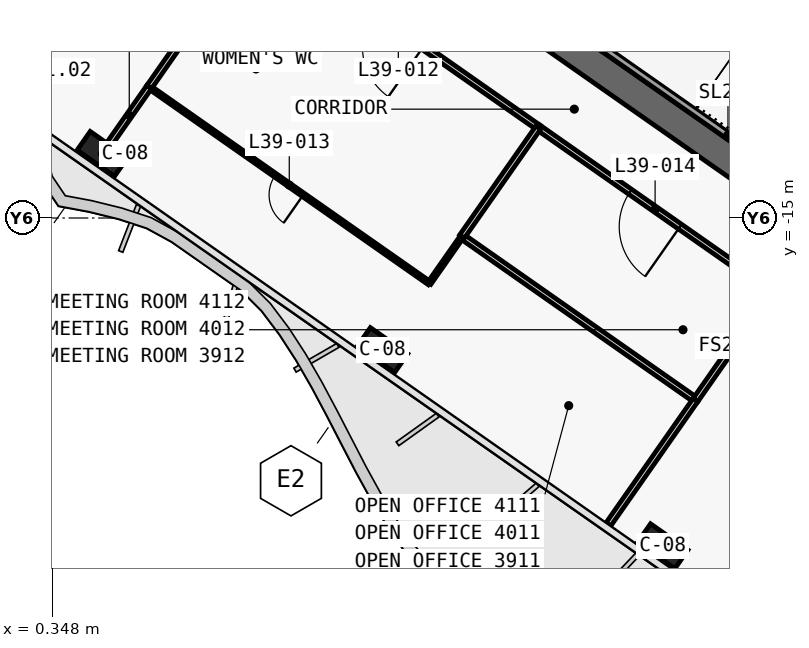
"""IFC4 building model, lengths in metres.
Left out: names, types, materials, properties, quantities, classifications, styles, units other than length and angle.
Written with IfcOpenShell. Run it as: python <this file> out.ifc"""

import sys

from ifc_helpers import new_model, si_unit, direction, frame, frame_2d, origin, origin_2d, place, context, subcontext, project, spatial, polyline, rectangle, outline, extrude, element, fill, save


model = new_model("IFC4")
c1 = context("Model", 3, precision=1e-05, world=origin(), true_north=direction((0.0, 1.0)))
c2 = subcontext(c1, "Body", "Model", "MODEL_VIEW")
j1 = project(units=[si_unit("LENGTHUNIT", "METRE"), si_unit("PLANEANGLEUNIT", "RADIAN")], contexts=[c1])
p1 = place(None, origin())
s1 = spatial("IfcSite", under=j1, at=p1, CompositionType="ELEMENT")
p2 = place(p1, origin())
s2 = spatial("IfcBuilding", under=s1, at=p2, CompositionType="ELEMENT")
p3 = place(p2, frame((0.0, 0.0, 171.0)))
s3 = spatial("IfcBuildingStorey", under=s2, at=p3, CompositionType="ELEMENT", Elevation=171.0)
p4 = place(p3, frame((-0.029, -0.712, 0.0), z_axis=(0.0, 0.0, 1.0), x_axis=(0.819151758019, -0.573576845187, 0.0)))
e1 = element("IfcWall", 1, at=p4, inside=s3, PredefinedType="SHEAR", context=c2, shape_type="SweptSolid", body=[
    extrude(outline(polyline([(26.616, 0.4), (-0.0, 0.4), (0.56, -0.4), (26.616, -0.4), (26.616, 0.4)])), origin(), (0.0, 0.0, 1.0), 3.9),
])
p5 = place(p4, frame((0.966, 0.0, 0.0)))
e2 = element("IfcOpeningElement", 2, at=p5, cuts=e1, PredefinedType="OPENING", context=c2, shape_type="SweptSolid", body=[
    extrude(rectangle(XDim=1.5, YDim=2.1, at=frame_2d((0.75, 1.05))), frame((0.0, 0.41, 0.0), z_axis=(0.0, -1.0, 0.0), x_axis=(1.0, 0.0, 0.0)), (0.0, 0.0, 1.0), 0.82),
])
p6 = place(p4, frame((12.366, 0.0, 0.0)))
e3 = element("IfcOpeningElement", 3, at=p6, cuts=e1, PredefinedType="OPENING", context=c2, shape_type="SweptSolid", body=[
    extrude(rectangle(XDim=1.5, YDim=2.1, at=frame_2d((0.75, 1.05))), frame((0.0, 0.41, 0.0), z_axis=(0.0, -1.0, 0.0), x_axis=(1.0, 0.0, 0.0)), (0.0, 0.0, 1.0), 0.82),
])
p7 = place(p3, frame((2.638, 3.768, 0.0), z_axis=(0.0, 0.0, 1.0), x_axis=(0.81915267502, -0.573575535572, 0.0)))
e4 = element("IfcWall", 4, at=p7, inside=s3, PredefinedType="SHEAR", context=c2, shape_type="SweptSolid", body=[
    extrude(outline(polyline([(0.0, 0.2), (0.0, -0.2), (26.2, -0.2), (26.2, 0.2), (0.0, 0.2)])), origin(), (0.0, 0.0, 1.0), 3.9),
])
p8 = place(p7, frame((9.637, 0.0, 0.0)))
e5 = element("IfcOpeningElement", 5, at=p8, cuts=e4, PredefinedType="OPENING", context=c2, shape_type="SweptSolid", body=[
    extrude(rectangle(XDim=1.2, YDim=2.1, at=frame_2d((0.6, 1.05))), frame((0.0, 0.21, 0.0), z_axis=(0.0, -1.0, 0.0), x_axis=(1.0, 0.0, 0.0)), (0.0, 0.0, 1.0), 0.42),
])
p9 = place(p7, frame((11.812, 0.0, 0.0)))
e6 = element("IfcOpeningElement", 6, at=p9, cuts=e4, PredefinedType="OPENING", context=c2, shape_type="SweptSolid", body=[
    extrude(rectangle(XDim=1.2, YDim=2.1, at=frame_2d((0.6, 1.05))), frame((0.0, 0.21, 0.0), z_axis=(0.0, -1.0, 0.0), x_axis=(1.0, 0.0, 0.0)), (0.0, 0.0, 1.0), 0.42),
])
p10 = place(p7, frame((13.988, 0.0, 0.0)))
e7 = element("IfcOpeningElement", 7, at=p10, cuts=e4, PredefinedType="OPENING", context=c2, shape_type="SweptSolid", body=[
    extrude(rectangle(XDim=1.2, YDim=2.1, at=frame_2d((0.6, 1.05))), frame((0.0, 0.21, 0.0), z_axis=(0.0, -1.0, 0.0), x_axis=(1.0, 0.0, 0.0)), (0.0, 0.0, 1.0), 0.42),
])
p11 = place(p7, frame((16.262, 0.0, 0.0)))
e8 = element("IfcOpeningElement", 8, at=p11, cuts=e4, PredefinedType="OPENING", context=c2, shape_type="SweptSolid", body=[
    extrude(rectangle(XDim=1.0, YDim=2.1, at=frame_2d((0.5, 1.05))), frame((0.0, 0.21, 0.0), z_axis=(0.0, -1.0, 0.0), x_axis=(1.0, 0.0, 0.0)), (0.0, 0.0, 1.0), 0.42),
])
for number, where, z_axis, x_axis in (
    (9, (1.665, -13.313, 0.0), (0.0, 0.0, 1.0), (0.819, -0.574, 0.0)),
    (10, (9.038, -18.475, 0.0), (0.0, 0.0, 1.0), (0.819, -0.574, 0.0)),
    (11, (16.41, -23.637, 0.0), (0.0, 0.0, 1.0), (0.819, -0.574, 0.0)),
):
    element("IfcColumn", number, at=place(p3, frame(where, z_axis=z_axis, x_axis=x_axis)), inside=s3, PredefinedType="COLUMN", context=c2, shape_type="SweptSolid", body=[
        extrude(rectangle(XDim=1.2, YDim=0.6, at=origin_2d()), origin(), (0.0, 0.0, 1.0), 3.9),
    ])
p12 = place(p3, frame((14.851, -10.521, 0.0), z_axis=(0.0, 0.0, 1.0), x_axis=(0.819141584393, -0.57359137434, 0.0)))
e12 = element("IfcWall", 12, at=p12, inside=s3, PredefinedType="SOLIDWALL", context=c2, shape_type="SweptSolid", body=[
    extrude(rectangle(XDim=8.0, YDim=0.2, at=frame_2d((4.0, 0.0))), origin(), (0.0, 0.0, 1.0), 3.62),
])
p13 = place(p3, frame((13.14, -12.619, 0.0), z_axis=(0.0, 0.0, 1.0), x_axis=(-0.81915291695, 0.57357519006, 0.0)))
e13 = element("IfcWall", 13, at=p13, inside=s3, PredefinedType="PARTITIONING", context=c2, shape_type="SweptSolid", body=[
    extrude(rectangle(XDim=9.002, YDim=0.15, at=frame_2d((4.501, 0.0))), origin(), (0.0, 0.0, 1.0), 3.0),
])
p14 = place(p13, frame((3.701, 0.0, 0.0)))
e14 = element("IfcOpeningElement", 14, at=p14, cuts=e13, PredefinedType="OPENING", context=c2, shape_type="SweptSolid", body=[
    extrude(rectangle(XDim=1.6, YDim=2.1, at=frame_2d((0.8, 1.05))), frame((0.0, 0.085, 0.0), z_axis=(0.0, -1.0, 0.0), x_axis=(1.0, 0.0, 0.0)), (0.0, 0.0, 1.0), 0.17),
])
p15 = place(p3, frame((19.284, -16.921, 0.0), z_axis=(0.0, 0.0, 1.0), x_axis=(-0.819153958035, 0.573573703229, 0.0)))
e15 = element("IfcWall", 15, at=p15, inside=s3, PredefinedType="PARTITIONING", context=c2, shape_type="SweptSolid", body=[
    extrude(rectangle(XDim=7.504, YDim=0.15, at=frame_2d((3.752, 0.0))), origin(), (0.0, 0.0, 1.0), 3.0),
])
p16 = place(p15, frame((2.952, 0.0, 0.0)))
e16 = element("IfcOpeningElement", 16, at=p16, cuts=e15, PredefinedType="OPENING", context=c2, shape_type="SweptSolid", body=[
    extrude(rectangle(XDim=1.6, YDim=2.1, at=frame_2d((0.8, 1.05))), frame((0.0, 0.085, 0.0), z_axis=(0.0, -1.0, 0.0), x_axis=(1.0, 0.0, 0.0)), (0.0, 0.0, 1.0), 0.17),
])
p17 = place(p3, frame((11.131, -15.486, 0.0), z_axis=(0.0, 0.0, 1.0), x_axis=(-0.573560650686, -0.819163097304, 0.0)))
e17 = element("IfcWall", 17, at=p17, inside=s3, PredefinedType="PARTITIONING", context=c2, shape_type="SweptSolid", body=[
    extrude(rectangle(XDim=1.5, YDim=0.1, at=frame_2d((0.75, 0.0))), origin(), (0.0, 0.0, 1.0), 3.0),
])
p18 = place(p3, frame((10.27, -16.715, 0.0), z_axis=(0.0, 0.0, 1.0), x_axis=(-0.819154173185, 0.573573395961, 0.0)))
e18 = element("IfcWall", 18, at=p18, inside=s3, PredefinedType="PARTITIONING", context=c2, shape_type="SweptSolid", body=[
    extrude(rectangle(XDim=9.0, YDim=0.1, at=frame_2d((4.5, 0.0))), origin(), (0.0, 0.0, 1.0), 3.0),
])
p19 = place(p18, frame((4.05, 0.0, 0.0)))
e19 = element("IfcOpeningElement", 19, at=p19, cuts=e18, PredefinedType="OPENING", context=c2, shape_type="SweptSolid", body=[
    extrude(rectangle(XDim=0.9, YDim=2.1, at=frame_2d((0.45, 1.05))), frame((0.0, 0.06, 0.0), z_axis=(0.0, -1.0, 0.0), x_axis=(1.0, 0.0, 0.0)), (0.0, 0.0, 1.0), 0.12),
])
p20 = place(p3, frame((11.131, -15.486, 0.0), z_axis=(0.0, 0.0, 1.0), x_axis=(0.819163097304, -0.573560650686, 0.0)))
e20 = element("IfcWall", 20, at=p20, inside=s3, PredefinedType="PARTITIONING", context=c2, shape_type="SweptSolid", body=[
    extrude(rectangle(XDim=7.5, YDim=0.15, at=frame_2d((3.75, 0.0))), origin(), (0.0, 0.0, 1.0), 3.0),
])
p21 = place(p3, frame((17.274, -19.788, 0.0), z_axis=(0.0, 0.0, 1.0), x_axis=(-0.57360163893, -0.819134396675, 0.0)))
e21 = element("IfcWall", 21, at=p21, inside=s3, PredefinedType="PARTITIONING", context=c2, shape_type="SweptSolid", body=[
    extrude(rectangle(XDim=3.999, YDim=0.15, at=frame_2d((2.0, 0.0))), origin(), (0.0, 0.0, 1.0), 2.9),
])
p22 = place(p3, frame((1.849, -13.051, 0.0), z_axis=(0.0, 0.0, 1.0), x_axis=(0.573623601139, 0.819119017125, 0.0)))
e22 = element("IfcWall", 22, at=p22, inside=s3, PredefinedType="PARTITIONING", context=c2, shape_type="SweptSolid", body=[
    extrude(rectangle(XDim=1.829, YDim=0.15, at=frame_2d((0.915, 0.0))), origin(), (0.0, 0.0, 1.0), 3.0),
])
p23 = place(p3, frame((13.139, -12.618, 0.0), z_axis=(0.0, 0.0, 1.0), x_axis=(-0.573523165603, -0.819189342287, 0.0)))
e23 = element("IfcWall", 23, at=p23, inside=s3, PredefinedType="PARTITIONING", context=c2, shape_type="SweptSolid", body=[
    extrude(rectangle(XDim=3.502, YDim=0.15, at=frame_2d((1.751, 0.0))), origin(), (0.0, 0.0, 1.0), 3.0),
])
p24 = place(p3, frame((2.898, -11.552, 0.0), z_axis=(0.0, 0.0, 1.0), x_axis=(0.573586866468, 0.819144740944, 0.0)))
e24 = element("IfcWall", 24, at=p24, inside=s3, PredefinedType="PARTITIONING", context=c2, shape_type="SweptSolid", body=[
    extrude(rectangle(XDim=5.0, YDim=0.15, at=frame_2d((2.5, 0.0))), origin(), (0.0, 0.0, 1.0), 3.0),
])
p25 = place(p3, frame((19.282, -16.92, 0.0), z_axis=(0.0, 0.0, 1.0), x_axis=(-0.573598101901, -0.81913687348, 0.0)))
e25 = element("IfcWall", 25, at=p25, inside=s3, PredefinedType="PARTITIONING", context=c2, shape_type="SweptSolid", body=[
    extrude(rectangle(XDim=3.5, YDim=0.15, at=frame_2d((1.75, 0.0))), origin(), (0.0, 0.0, 1.0), 3.62),
])
p26 = place(p19, origin())
e26 = element("IfcDoor", 26, at=p26, inside=s3, OperationType="SINGLE_SWING_RIGHT", PredefinedType="DOOR", context=c2, shape_type="SweptSolid", body=[
    extrude(rectangle(XDim=0.9, YDim=2.1, at=frame_2d((0.45, 1.05))), frame((0.0, 0.025, 0.0), z_axis=(0.0, -1.0, 0.0), x_axis=(1.0, 0.0, 0.0)), (0.0, 0.0, 1.0), 0.05),
])
fill(e19, e26)
p27 = place(p16, origin())
e27 = element("IfcDoor", 27, at=p27, inside=s3, OperationType="DOUBLE_DOOR_SINGLE_SWING", PredefinedType="DOOR", context=c2, shape_type="SweptSolid", body=[
    extrude(rectangle(XDim=1.6, YDim=2.1, at=frame_2d((0.8, 1.05))), frame((0.0, 0.025, 0.0), z_axis=(0.0, -1.0, 0.0), x_axis=(1.0, 0.0, 0.0)), (0.0, 0.0, 1.0), 0.05),
])
fill(e16, e27)
save(model, sys.argv[1])
